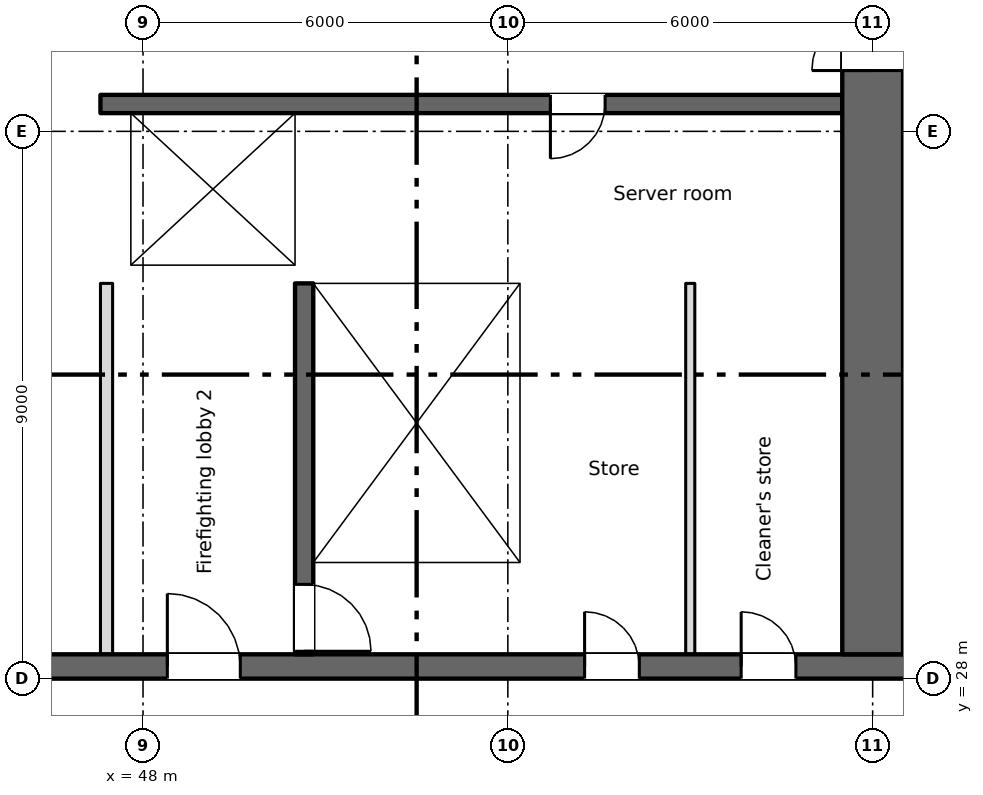
"""IFC4 building model, lengths in metres.
Left out: names, types, materials, properties, quantities, classifications, styles, units other than length and angle.
Written with IfcOpenShell. Run it as: python <this file> out.ifc"""

import sys

from ifc_helpers import new_model, si_unit, direction, frame, frame_2d, origin, place, context, subcontext, project, spatial, rectangle, extrude, element, fill, save


model = new_model("IFC4")
c1 = context("Model", 3, precision=1e-05, world=origin(), true_north=direction((0.0, 1.0)))
c2 = subcontext(c1, "Body", "Model", "MODEL_VIEW")
j1 = project(units=[si_unit("LENGTHUNIT", "METRE"), si_unit("PLANEANGLEUNIT", "RADIAN")], contexts=[c1])
p1 = place(None, origin())
s1 = spatial("IfcSite", under=j1, at=p1, CompositionType="ELEMENT")
p2 = place(p1, origin())
s2 = spatial("IfcBuilding", under=s1, at=p2, CompositionType="ELEMENT")
p3 = place(p2, frame((0.0, 0.0, 52.5)))
s3 = spatial("IfcBuildingStorey", under=s2, at=p3, CompositionType="ELEMENT", Elevation=52.5)
p4 = place(p3, frame((6.7, 28.2, 0.0), z_axis=(0.0, 0.0, 1.0), x_axis=(1.0, 0.0, 0.0)))
e1 = element("IfcWall", 1, at=p4, inside=s3, PredefinedType="SHEAR", context=c2, shape_type="SweptSolid", body=[
    extrude(rectangle(XDim=57.8, YDim=0.4, at=frame_2d((28.9, 0.0))), origin(), (0.0, 0.0, 1.0), 3.35),
])
p5 = place(p4, frame((13.85, 0.0, 0.0)))
e2 = element("IfcOpeningElement", 2, at=p5, cuts=e1, PredefinedType="OPENING", context=c2, shape_type="SweptSolid", body=[
    extrude(rectangle(XDim=0.9, YDim=2.1, at=frame_2d((0.45, 1.05))), frame((0.0, 0.21, 0.0), z_axis=(0.0, -1.0, 0.0), x_axis=(1.0, 0.0, 0.0)), (0.0, 0.0, 1.0), 0.42),
])
p6 = place(p4, frame((48.562, 0.0, 0.0)))
e3 = element("IfcOpeningElement", 3, at=p6, cuts=e1, PredefinedType="OPENING", context=c2, shape_type="SweptSolid", body=[
    extrude(rectangle(XDim=0.9, YDim=2.1, at=frame_2d((0.45, 1.05))), frame((0.0, 0.21, 0.0), z_axis=(0.0, -1.0, 0.0), x_axis=(1.0, 0.0, 0.0)), (0.0, 0.0, 1.0), 0.42),
])
p7 = place(p4, frame((51.137, 0.0, 0.0)))
e4 = element("IfcOpeningElement", 4, at=p7, cuts=e1, PredefinedType="OPENING", context=c2, shape_type="SweptSolid", body=[
    extrude(rectangle(XDim=0.9, YDim=2.1, at=frame_2d((0.45, 1.05))), frame((0.0, 0.21, 0.0), z_axis=(0.0, -1.0, 0.0), x_axis=(1.0, 0.0, 0.0)), (0.0, 0.0, 1.0), 0.42),
])
p8 = place(p4, frame((1.35, 0.0, 0.0)))
e5 = element("IfcOpeningElement", 5, at=p8, cuts=e1, PredefinedType="OPENING", context=c2, shape_type="SweptSolid", body=[
    extrude(rectangle(XDim=0.9, YDim=2.1, at=frame_2d((0.45, 1.05))), frame((0.0, 0.21, 0.0), z_axis=(0.0, -1.0, 0.0), x_axis=(1.0, 0.0, 0.0)), (0.0, 0.0, 1.0), 0.42),
])
p9 = place(p4, frame((4.7, 0.0, 0.0)))
e6 = element("IfcOpeningElement", 6, at=p9, cuts=e1, PredefinedType="OPENING", context=c2, shape_type="SweptSolid", body=[
    extrude(rectangle(XDim=1.2, YDim=2.1, at=frame_2d((0.6, 1.05))), frame((0.0, 0.21, 0.0), z_axis=(0.0, -1.0, 0.0), x_axis=(1.0, 0.0, 0.0)), (0.0, 0.0, 1.0), 0.42),
])
p10 = place(p4, frame((31.7, 0.0, 0.0)))
e7 = element("IfcOpeningElement", 7, at=p10, cuts=e1, PredefinedType="OPENING", context=c2, shape_type="SweptSolid", body=[
    extrude(rectangle(XDim=1.2, YDim=2.1, at=frame_2d((0.6, 1.05))), frame((0.0, 0.21, 0.0), z_axis=(0.0, -1.0, 0.0), x_axis=(1.0, 0.0, 0.0)), (0.0, 0.0, 1.0), 0.42),
])
p11 = place(p4, frame((55.2, 0.0, 0.0)))
e8 = element("IfcOpeningElement", 8, at=p11, cuts=e1, PredefinedType="OPENING", context=c2, shape_type="SweptSolid", body=[
    extrude(rectangle(XDim=1.2, YDim=2.1, at=frame_2d((0.6, 1.05))), frame((0.0, 0.21, 0.0), z_axis=(0.0, -1.0, 0.0), x_axis=(1.0, 0.0, 0.0)), (0.0, 0.0, 1.0), 0.42),
])
p12 = place(p4, frame((21.7, 0.0, 0.0)))
e9 = element("IfcOpeningElement", 9, at=p12, cuts=e1, PredefinedType="OPENING", context=c2, shape_type="SweptSolid", body=[
    extrude(rectangle(XDim=1.2, YDim=2.1, at=frame_2d((0.6, 1.05))), frame((0.0, 0.21, 0.0), z_axis=(0.0, -1.0, 0.0), x_axis=(1.0, 0.0, 0.0)), (0.0, 0.0, 1.0), 0.42),
])
p13 = place(p4, frame((41.7, 0.0, 0.0)))
e10 = element("IfcOpeningElement", 10, at=p13, cuts=e1, PredefinedType="OPENING", context=c2, shape_type="SweptSolid", body=[
    extrude(rectangle(XDim=1.2, YDim=2.1, at=frame_2d((0.6, 1.05))), frame((0.0, 0.21, 0.0), z_axis=(0.0, -1.0, 0.0), x_axis=(1.0, 0.0, 0.0)), (0.0, 0.0, 1.0), 0.42),
])
p14 = place(p4, frame((24.85, 0.0, 0.0)))
e11 = element("IfcOpeningElement", 11, at=p14, cuts=e1, PredefinedType="OPENING", context=c2, shape_type="SweptSolid", body=[
    extrude(rectangle(XDim=2.4, YDim=2.1, at=frame_2d((1.2, 1.05))), frame((0.0, 0.21, 0.0), z_axis=(0.0, -1.0, 0.0), x_axis=(1.0, 0.0, 0.0)), (0.0, 0.0, 1.0), 0.42),
])
p15 = place(p4, frame((37.35, 0.0, 0.0)))
e12 = element("IfcOpeningElement", 12, at=p15, cuts=e1, PredefinedType="OPENING", context=c2, shape_type="SweptSolid", body=[
    extrude(rectangle(XDim=2.4, YDim=2.1, at=frame_2d((1.2, 1.05))), frame((0.0, 0.21, 0.0), z_axis=(0.0, -1.0, 0.0), x_axis=(1.0, 0.0, 0.0)), (0.0, 0.0, 1.0), 0.42),
])
p16 = place(p4, frame((7.85, 0.0, 0.0)))
e13 = element("IfcOpeningElement", 13, at=p16, cuts=e1, PredefinedType="OPENING", context=c2, shape_type="SweptSolid", body=[
    extrude(rectangle(XDim=2.4, YDim=2.1, at=frame_2d((1.2, 1.05))), frame((0.0, 0.21, 0.0), z_axis=(0.0, -1.0, 0.0), x_axis=(1.0, 0.0, 0.0)), (0.0, 0.0, 1.0), 0.42),
])
p17 = place(p4, frame((28.85, 0.0, 0.0)))
e14 = element("IfcOpeningElement", 14, at=p17, cuts=e1, PredefinedType="OPENING", context=c2, shape_type="SweptSolid", body=[
    extrude(rectangle(XDim=0.9, YDim=2.1, at=frame_2d((0.45, 1.05))), frame((0.0, 0.21, 0.0), z_axis=(0.0, -1.0, 0.0), x_axis=(1.0, 0.0, 0.0)), (0.0, 0.0, 1.0), 0.42),
])
p18 = place(p4, frame((34.85, 0.0, 0.0)))
e15 = element("IfcOpeningElement", 15, at=p18, cuts=e1, PredefinedType="OPENING", context=c2, shape_type="SweptSolid", body=[
    extrude(rectangle(XDim=0.9, YDim=2.1, at=frame_2d((0.45, 1.05))), frame((0.0, 0.21, 0.0), z_axis=(0.0, -1.0, 0.0), x_axis=(1.0, 0.0, 0.0)), (0.0, 0.0, 1.0), 0.42),
])
p19 = place(p3, frame((60.0, 28.4, 0.0), z_axis=(0.0, 0.0, 1.0), x_axis=(0.0, 1.0, 0.0)))
e16 = element("IfcWall", 16, at=p19, inside=s3, PredefinedType="SHEAR", context=c2, shape_type="SweptSolid", body=[
    extrude(rectangle(XDim=16.6, YDim=1.0, at=frame_2d((8.3, 0.0))), origin(), (0.0, 0.0, 1.0), 3.35),
])
p20 = place(p19, frame((9.6, 0.0, 0.0)))
e17 = element("IfcOpeningElement", 17, at=p20, cuts=e16, PredefinedType="OPENING", context=c2, shape_type="SweptSolid", body=[
    extrude(rectangle(XDim=2.0, YDim=2.1, at=frame_2d((1.0, 1.05))), frame((0.0, 0.51, 0.0), z_axis=(0.0, -1.0, 0.0), x_axis=(1.0, 0.0, 0.0)), (0.0, 0.0, 1.0), 1.02),
])
p21 = place(p19, frame((15.25, 0.0, 0.0)))
e18 = element("IfcOpeningElement", 18, at=p21, cuts=e16, PredefinedType="OPENING", context=c2, shape_type="SweptSolid", body=[
    extrude(rectangle(XDim=1.2, YDim=2.1, at=frame_2d((0.6, 1.05))), frame((0.0, 0.51, 0.0), z_axis=(0.0, -1.0, 0.0), x_axis=(1.0, 0.0, 0.0)), (0.0, 0.0, 1.0), 1.02),
])
p22 = place(p3, frame((50.65, 34.5, 0.0), z_axis=(0.0, 0.0, 1.0), x_axis=(0.0, -1.0, 0.0)))
e19 = element("IfcWall", 19, at=p22, inside=s3, PredefinedType="SHEAR", context=c2, shape_type="SweptSolid", body=[
    extrude(rectangle(XDim=6.1, YDim=0.3, at=frame_2d((3.05, 0.0))), origin(), (0.0, 0.0, 1.0), 3.35),
])
p23 = place(p22, frame((4.95, 0.0, 0.0)))
e20 = element("IfcOpeningElement", 20, at=p23, cuts=e19, PredefinedType="OPENING", context=c2, shape_type="SweptSolid", body=[
    extrude(rectangle(XDim=1.1, YDim=2.1, at=frame_2d((0.55, 1.05))), frame((0.0, 0.16, 0.0), z_axis=(0.0, -1.0, 0.0), x_axis=(1.0, 0.0, 0.0)), (0.0, 0.0, 1.0), 0.32),
])
for number, where, z_axis, x_axis in (
    (21, (54.35, 28.4, 0.0), (0.0, 0.0, 1.0), (0.0, 1.0, 0.0)),
    (22, (60.65, 28.4, 0.0), (0.0, 0.0, 1.0), (0.0, 1.0, 0.0)),
):
    element("IfcWall", number, at=place(p3, frame(where, z_axis=z_axis, x_axis=x_axis)), inside=s3, PredefinedType="SHEAR", context=c2, shape_type="SweptSolid", body=[
        extrude(rectangle(XDim=6.1, YDim=0.3, at=frame_2d((3.05, 0.0))), origin(), (0.0, 0.0, 1.0), 3.35),
    ])
p24 = place(p3, frame((47.3, 34.65, 0.0), z_axis=(0.0, 0.0, 1.0), x_axis=(1.0, 0.0, 0.0)))
e23 = element("IfcWall", 23, at=p24, inside=s3, PredefinedType="SHEAR", context=c2, shape_type="SweptSolid", body=[
    extrude(rectangle(XDim=12.2, YDim=0.3, at=frame_2d((6.1, 0.0))), origin(), (0.0, 0.0, 1.0), 3.35),
])
p25 = place(p24, frame((1.3, 0.0, 0.0)))
e24 = element("IfcOpeningElement", 24, at=p25, cuts=e23, PredefinedType="OPENING", context=c2, shape_type="SweptSolid", body=[
    extrude(rectangle(XDim=1.1, YDim=2.1, at=frame_2d((0.55, 1.05))), frame((0.0, 0.16, 0.0), z_axis=(0.0, -1.0, 0.0), x_axis=(1.0, 0.0, 0.0)), (0.0, 0.0, 1.0), 0.32),
])
p26 = place(p3, frame((59.5, 37.45, 0.0), z_axis=(0.0, 0.0, 1.0), x_axis=(-1.0, 0.0, 0.0)))
e25 = element("IfcWall", 25, at=p26, inside=s3, PredefinedType="SHEAR", context=c2, shape_type="SweptSolid", body=[
    extrude(rectangle(XDim=12.2, YDim=0.3, at=frame_2d((6.1, 0.0))), origin(), (0.0, 0.0, 1.0), 3.35),
])
p27 = place(p26, frame((3.9, 0.0, 0.0)))
e26 = element("IfcOpeningElement", 26, at=p27, cuts=e25, PredefinedType="OPENING", context=c2, shape_type="SweptSolid", body=[
    extrude(rectangle(XDim=0.9, YDim=2.1, at=frame_2d((0.45, 1.05))), frame((0.0, 0.16, 0.0), z_axis=(0.0, -1.0, 0.0), x_axis=(1.0, 0.0, 0.0)), (0.0, 0.0, 1.0), 0.32),
])
p28 = place(p3, frame((47.55, 34.8, 0.0), z_axis=(0.0, 0.0, 1.0), x_axis=(0.0, 1.0, 0.0)))
e27 = element("IfcWall", 27, at=p28, inside=s3, PredefinedType="SHEAR", context=c2, shape_type="SweptSolid", body=[
    extrude(rectangle(XDim=2.5, YDim=0.5, at=frame_2d((1.25, 0.0))), origin(), (0.0, 0.0, 1.0), 3.35),
])
p29 = place(p3, frame((50.65, 34.8, 0.0), z_axis=(0.0, 0.0, 1.0), x_axis=(0.0, 1.0, 0.0)))
e28 = element("IfcWall", 28, at=p29, inside=s3, PredefinedType="SHEAR", context=c2, shape_type="SweptSolid", body=[
    extrude(rectangle(XDim=2.5, YDim=0.3, at=frame_2d((1.25, 0.0))), origin(), (0.0, 0.0, 1.0), 3.35),
])
p30 = place(p3, frame((47.4, 28.4, 0.0), z_axis=(0.0, 0.0, 1.0), x_axis=(0.0, 1.0, 0.0)))
e29 = element("IfcWall", 29, at=p30, inside=s3, PredefinedType="PARTITIONING", context=c2, shape_type="SweptSolid", body=[
    extrude(rectangle(XDim=6.1, YDim=0.2, at=frame_2d((3.05, 0.0))), origin(), (0.0, 0.0, 1.0), 3.35),
])
p31 = place(p3, frame((57.0, 28.4, 0.0), z_axis=(0.0, 0.0, 1.0), x_axis=(0.0, 1.0, 0.0)))
e30 = element("IfcWall", 30, at=p31, inside=s3, PredefinedType="PARTITIONING", context=c2, shape_type="SweptSolid", body=[
    extrude(rectangle(XDim=6.1, YDim=0.15, at=frame_2d((3.05, 0.0))), origin(), (0.0, 0.0, 1.0), 3.35),
])
p32 = place(p6, origin())
e31 = element("IfcDoor", 31, at=p32, inside=s3, OperationType="SINGLE_SWING_LEFT", PredefinedType="DOOR", context=c2, shape_type="SweptSolid", body=[
    extrude(rectangle(XDim=0.9, YDim=2.1, at=frame_2d((0.45, 1.05))), frame((0.0, 0.025, 0.0), z_axis=(0.0, -1.0, 0.0), x_axis=(1.0, 0.0, 0.0)), (0.0, 0.0, 1.0), 0.05),
])
fill(e3, e31)
p33 = place(p7, origin())
e32 = element("IfcDoor", 32, at=p33, inside=s3, OperationType="SINGLE_SWING_LEFT", PredefinedType="DOOR", context=c2, shape_type="SweptSolid", body=[
    extrude(rectangle(XDim=0.9, YDim=2.1, at=frame_2d((0.45, 1.05))), frame((0.0, 0.025, 0.0), z_axis=(0.0, -1.0, 0.0), x_axis=(1.0, 0.0, 0.0)), (0.0, 0.0, 1.0), 0.05),
])
fill(e4, e32)
p34 = place(p27, origin())
e33 = element("IfcDoor", 33, at=p34, inside=s3, OperationType="SINGLE_SWING_RIGHT", PredefinedType="DOOR", context=c2, shape_type="SweptSolid", body=[
    extrude(rectangle(XDim=0.9, YDim=2.1, at=frame_2d((0.45, 1.05))), frame((0.0, 0.025, 0.0), z_axis=(0.0, -1.0, 0.0), x_axis=(1.0, 0.0, 0.0)), (0.0, 0.0, 1.0), 0.05),
])
fill(e26, e33)
p35 = place(p25, origin())
e34 = element("IfcDoor", 34, at=p35, inside=s3, OperationType="SLIDING_TO_LEFT", PredefinedType="DOOR", context=c2, shape_type="SweptSolid", body=[
    extrude(rectangle(XDim=1.1, YDim=2.1, at=frame_2d((0.55, 1.05))), frame((0.0, 0.025, 0.0), z_axis=(0.0, -1.0, 0.0), x_axis=(1.0, 0.0, 0.0)), (0.0, 0.0, 1.0), 0.05),
])
fill(e24, e34)
p36 = place(p23, origin())
e35 = element("IfcDoor", 35, at=p36, inside=s3, OperationType="SINGLE_SWING_RIGHT", PredefinedType="DOOR", context=c2, shape_type="SweptSolid", body=[
    extrude(rectangle(XDim=1.1, YDim=2.1, at=frame_2d((0.55, 1.05))), frame((0.0, 0.025, 0.0), z_axis=(0.0, -1.0, 0.0), x_axis=(1.0, 0.0, 0.0)), (0.0, 0.0, 1.0), 0.05),
])
fill(e20, e35)
p37 = place(p13, origin())
e36 = element("IfcDoor", 36, at=p37, inside=s3, OperationType="SINGLE_SWING_LEFT", PredefinedType="DOOR", context=c2, shape_type="SweptSolid", body=[
    extrude(rectangle(XDim=1.2, YDim=2.1, at=frame_2d((0.6, 1.05))), frame((0.0, 0.025, 0.0), z_axis=(0.0, -1.0, 0.0), x_axis=(1.0, 0.0, 0.0)), (0.0, 0.0, 1.0), 0.05),
])
fill(e10, e36)
p38 = place(p20, origin())
e37 = element("IfcDoor", 37, at=p38, inside=s3, OperationType="DOUBLE_DOOR_SINGLE_SWING", PredefinedType="DOOR", context=c2, shape_type="SweptSolid", body=[
    extrude(rectangle(XDim=2.0, YDim=2.1, at=frame_2d((1.0, 1.05))), frame((0.0, 0.025, 0.0), z_axis=(0.0, -1.0, 0.0), x_axis=(1.0, 0.0, 0.0)), (0.0, 0.0, 1.0), 0.05),
])
fill(e17, e37)
save(model, sys.argv[1])
